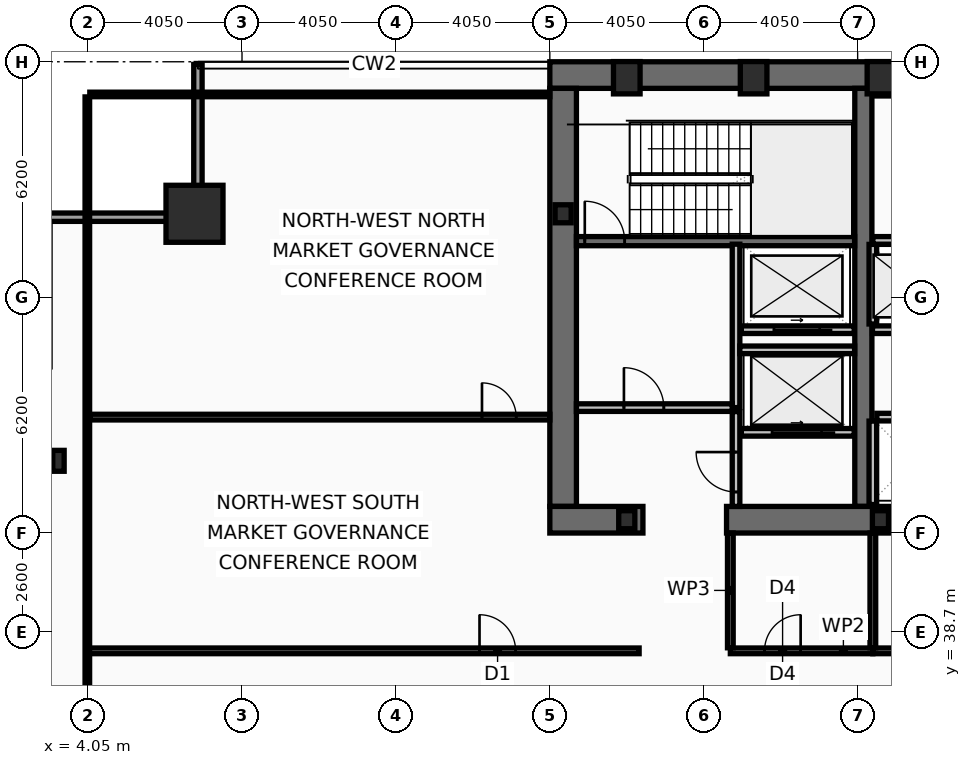
"""IFC4 building model, lengths in metres.
Left out: names, types, materials, properties, quantities, classifications, styles, units other than length and angle.
Written with IfcOpenShell. Run it as: python <this file> out.ifc"""

import sys

from ifc_helpers import new_model, si_unit, direction, frame, frame_2d, origin, origin_2d, place, context, subcontext, project, spatial, rectangle, hollow_rectangle, i_section, extrude, element, fill, save


model = new_model("IFC4")
c1 = context("Model", 3, precision=1e-05, world=origin(), true_north=direction((0.0, 1.0)))
c2 = subcontext(c1, "Body", "Model", "MODEL_VIEW")
j1 = project(units=[si_unit("LENGTHUNIT", "METRE"), si_unit("PLANEANGLEUNIT", "RADIAN")], contexts=[c1])
p1 = place(None, origin())
s1 = spatial("IfcSite", under=j1, at=p1, CompositionType="ELEMENT")
p2 = place(p1, origin())
s2 = spatial("IfcBuilding", under=s1, at=p2, CompositionType="ELEMENT")
p3 = place(p2, frame((0.0, 0.0, 102.6)))
s3 = spatial("IfcBuildingStorey", under=s2, at=p3, CompositionType="ELEMENT", Elevation=102.6)
p4 = place(p3, frame((16.2, 53.35, 0.0), z_axis=(0.0, 0.0, 1.0), x_axis=(1.0, 0.0, 0.0)))
e1 = element("IfcWall", 1, at=p4, inside=s3, PredefinedType="SHEAR", context=c2, shape_type="SweptSolid", body=[
    extrude(rectangle(XDim=40.5, YDim=0.7, at=frame_2d((20.25, 0.0))), origin(), (0.0, 0.0, 1.0), 3.8),
])
p5 = place(p3, frame((16.55, 42.0, 0.0), z_axis=(0.0, 0.0, 1.0), x_axis=(0.0, 1.0, 0.0)))
e2 = element("IfcWall", 2, at=p5, inside=s3, PredefinedType="SHEAR", context=c2, shape_type="SweptSolid", body=[
    extrude(rectangle(XDim=11.0, YDim=0.7, at=frame_2d((5.5, 0.0))), origin(), (0.0, 0.0, 1.0), 3.8),
])
p6 = place(p3, frame((24.45, 42.0, 0.0), z_axis=(0.0, 0.0, 1.0), x_axis=(0.0, 1.0, 0.0)))
e3 = element("IfcWall", 3, at=p6, inside=s3, PredefinedType="SHEAR", context=c2, shape_type="SweptSolid", body=[
    extrude(rectangle(XDim=11.0, YDim=0.45, at=frame_2d((5.5, 0.0))), origin(), (0.0, 0.0, 1.0), 3.8),
])
p7 = place(p3, frame((18.65, 41.65, 0.0), z_axis=(0.0, 0.0, 1.0), x_axis=(-1.0, 0.0, 0.0)))
e4 = element("IfcWall", 4, at=p7, inside=s3, PredefinedType="SHEAR", context=c2, shape_type="SweptSolid", body=[
    extrude(rectangle(XDim=2.45, YDim=0.7, at=frame_2d((1.225, 0.0))), origin(), (0.0, 0.0, 1.0), 3.8),
])
p8 = place(p3, frame((32.3, 41.65, 0.0), z_axis=(0.0, 0.0, 1.0), x_axis=(-1.0, 0.0, 0.0)))
e5 = element("IfcWall", 5, at=p8, inside=s3, PredefinedType="SHEAR", context=c2, shape_type="SweptSolid", body=[
    extrude(rectangle(XDim=11.45, YDim=0.7, at=frame_2d((5.725, 0.0))), origin(), (0.0, 0.0, 1.0), 3.8),
])
p9 = place(p3, frame((16.9, 48.98, 0.0), z_axis=(0.0, 0.0, 1.0), x_axis=(1.0, 0.0, 0.0)))
e6 = element("IfcWall", 6, at=p9, inside=s3, PredefinedType="SHEAR", context=c2, shape_type="SweptSolid", body=[
    extrude(rectangle(XDim=7.32, YDim=0.24, at=frame_2d((3.66, 0.0))), origin(), (0.0, 0.0, 1.0), 3.8),
])
p10 = place(p9, frame((0.22, 0.0, 0.0)))
e7 = element("IfcOpeningElement", 7, at=p10, cuts=e6, PredefinedType="OPENING", context=c2, shape_type="SweptSolid", body=[
    extrude(rectangle(XDim=1.05, YDim=2.15, at=frame_2d((0.525, 1.075))), frame((0.0, 0.13, 0.0), z_axis=(0.0, -1.0, 0.0), x_axis=(1.0, 0.0, 0.0)), (0.0, 0.0, 1.0), 0.26),
])
p11 = place(p3, frame((6.85, 49.7, 0.0), z_axis=(0.0, 0.0, 1.0), x_axis=(1.0, 0.0, 0.0)))
e8 = element("IfcColumn", 8, at=p11, inside=s3, PredefinedType="COLUMN", context=c2, shape_type="SweptSolid", body=[
    extrude(hollow_rectangle(XDim=1.5, YDim=1.5, WallThickness=0.07, at=origin_2d()), origin(), (0.0, 0.0, 1.0), 4.0),
])
for number, where, z_axis, x_axis in (
    (9, (18.225, 53.28, 0.0), (0.0, 0.0, 1.0), (1.0, 0.0, 0.0)),
    (10, (21.562, 53.28, 0.0), (0.0, 0.0, 1.0), (1.0, 0.0, 0.0)),
    (11, (24.9, 53.28, 0.0), (0.0, 0.0, 1.0), (1.0, 0.0, 0.0)),
):
    element("IfcColumn", number, at=place(p3, frame(where, z_axis=z_axis, x_axis=x_axis)), inside=s3, PredefinedType="COLUMN", context=c2, shape_type="SweptSolid", body=[
        extrude(hollow_rectangle(XDim=0.7, YDim=0.85, WallThickness=0.05, at=origin_2d()), origin(), (0.0, 0.0, 1.0), 4.0),
    ])
p12 = place(p3, frame((3.27, 43.2, 0.0), z_axis=(0.0, 0.0, 1.0), x_axis=(1.0, 0.0, 0.0)))
e12 = element("IfcColumn", 12, at=p12, inside=s3, PredefinedType="COLUMN", context=c2, shape_type="SweptSolid", body=[
    extrude(i_section(OverallWidth=0.3, OverallDepth=0.55, WebThickness=0.015, FlangeThickness=0.029, at=origin_2d()), origin(), (0.0, 0.0, 1.0), 4.0),
])
for number, where, z_axis, x_axis in (
    (13, (16.55, 49.7, 0.0), (0.0, 0.0, 1.0), (1.0, 0.0, 0.0)),
    (14, (18.225, 41.65, 0.0), (0.0, 0.0, 1.0), (1.0, 0.0, 0.0)),
    (15, (24.9, 41.65, 0.0), (0.0, 0.0, 1.0), (1.0, 0.0, 0.0)),
):
    element("IfcColumn", number, at=place(p3, frame(where, z_axis=z_axis, x_axis=x_axis)), inside=s3, PredefinedType="COLUMN", context=c2, shape_type="SweptSolid", body=[
        extrude(i_section(OverallWidth=0.424, OverallDepth=0.474, WebThickness=0.048, FlangeThickness=0.077, at=origin_2d()), origin(), (0.0, 0.0, 1.0), 4.0),
    ])
p13 = place(p3, frame((2.83, 49.61, 0.0), z_axis=(0.0, 0.0, 1.0), x_axis=(1.0, 0.0, 0.0)))
e16 = element("IfcWall", 16, at=p13, inside=s3, PredefinedType="SOLIDWALL", context=c2, shape_type="SweptSolid", body=[
    extrude(rectangle(XDim=4.22, YDim=0.22, at=frame_2d((2.11, 0.0))), origin(), (0.0, 0.0, 1.0), 3.14),
])
p14 = place(p3, frame((6.94, 49.72, 0.0), z_axis=(0.0, 0.0, 1.0), x_axis=(0.0, 1.0, 0.0)))
e17 = element("IfcWall", 17, at=p14, inside=s3, PredefinedType="SOLIDWALL", context=c2, shape_type="SweptSolid", body=[
    extrude(rectangle(XDim=3.91, YDim=0.22, at=frame_2d((1.955, 0.0))), origin(), (0.0, 0.0, 1.0), 3.14),
])
p15 = place(p3, frame((24.21, 43.95, 0.0), z_axis=(0.0, 0.0, 1.0), x_axis=(-1.0, 0.0, 0.0)))
e18 = element("IfcWall", 18, at=p15, inside=s3, PredefinedType="PARTITIONING", context=c2, shape_type="SweptSolid", body=[
    extrude(rectangle(XDim=2.97, YDim=0.2, at=frame_2d((1.485, 0.0))), origin(), (0.0, 0.0, 1.0), 3.8),
])
p16 = place(p15, frame((0.86, 0.0, 0.0)))
e19 = element("IfcOpeningElement", 19, at=p16, cuts=e18, PredefinedType="OPENING", context=c2, shape_type="SweptSolid", body=[
    extrude(rectangle(XDim=1.3, YDim=2.18, at=frame_2d((0.65, 1.09))), frame((0.0, 0.11, 0.0), z_axis=(0.0, -1.0, 0.0), x_axis=(1.0, 0.0, 0.0)), (0.0, 0.0, 1.0), 0.22),
])
p17 = place(p3, frame((24.21, 46.65, 0.0), z_axis=(0.0, 0.0, 1.0), x_axis=(-1.0, 0.0, 0.0)))
e20 = element("IfcWall", 20, at=p17, inside=s3, PredefinedType="PARTITIONING", context=c2, shape_type="SweptSolid", body=[
    extrude(rectangle(XDim=2.97, YDim=0.2, at=frame_2d((1.485, 0.0))), origin(), (0.0, 0.0, 1.0), 3.8),
])
p18 = place(p17, frame((0.91, 0.0, 0.0)))
e21 = element("IfcOpeningElement", 21, at=p18, cuts=e20, PredefinedType="OPENING", context=c2, shape_type="SweptSolid", body=[
    extrude(rectangle(XDim=1.2, YDim=2.18, at=frame_2d((0.6, 1.09))), frame((0.0, 0.11, 0.0), z_axis=(0.0, -1.0, 0.0), x_axis=(1.0, 0.0, 0.0)), (0.0, 0.0, 1.0), 0.22),
])
p19 = place(p3, frame((31.22, 46.65, 0.0), z_axis=(0.0, 0.0, 1.0), x_axis=(-1.0, 0.0, 0.0)))
e22 = element("IfcWall", 22, at=p19, inside=s3, PredefinedType="PARTITIONING", context=c2, shape_type="SweptSolid", body=[
    extrude(rectangle(XDim=6.53, YDim=0.2, at=frame_2d((3.265, 0.0))), origin(), (0.0, 0.0, 1.0), 3.8),
])
p20 = place(p19, frame((4.9, 0.0, 0.0)))
e23 = element("IfcOpeningElement", 23, at=p20, cuts=e22, PredefinedType="OPENING", context=c2, shape_type="SweptSolid", body=[
    extrude(rectangle(XDim=1.1, YDim=2.18, at=frame_2d((0.55, 1.09))), frame((0.0, 0.11, 0.0), z_axis=(0.0, -1.0, 0.0), x_axis=(1.0, 0.0, 0.0)), (0.0, 0.0, 1.0), 0.22),
])
p21 = place(p19, frame((2.74, 0.0, 0.0)))
e24 = element("IfcOpeningElement", 24, at=p21, cuts=e22, PredefinedType="OPENING", context=c2, shape_type="SweptSolid", body=[
    extrude(rectangle(XDim=1.1, YDim=2.18, at=frame_2d((0.55, 1.09))), frame((0.0, 0.11, 0.0), z_axis=(0.0, -1.0, 0.0), x_axis=(1.0, 0.0, 0.0)), (0.0, 0.0, 1.0), 0.22),
])
p22 = place(p19, frame((0.58, 0.0, 0.0)))
e25 = element("IfcOpeningElement", 25, at=p22, cuts=e22, PredefinedType="OPENING", context=c2, shape_type="SweptSolid", body=[
    extrude(rectangle(XDim=1.1, YDim=2.18, at=frame_2d((0.55, 1.09))), frame((0.0, 0.11, 0.0), z_axis=(0.0, -1.0, 0.0), x_axis=(1.0, 0.0, 0.0)), (0.0, 0.0, 1.0), 0.22),
])
p23 = place(p3, frame((21.1, 44.6, 0.0), z_axis=(0.0, 0.0, 1.0), x_axis=(0.0, 1.0, 0.0)))
e26 = element("IfcWall", 26, at=p23, inside=s3, PredefinedType="PARTITIONING", context=c2, shape_type="SweptSolid", body=[
    extrude(rectangle(XDim=4.3, YDim=0.2, at=frame_2d((2.15, 0.0))), origin(), (0.0, 0.0, 1.0), 3.8),
])
p24 = place(p3, frame((16.9, 44.6, 0.0), z_axis=(0.0, 0.0, 1.0), x_axis=(1.0, 0.0, 0.0)))
e27 = element("IfcWall", 27, at=p24, inside=s3, PredefinedType="PARTITIONING", context=c2, shape_type="SweptSolid", body=[
    extrude(rectangle(XDim=4.1, YDim=0.2, at=frame_2d((2.05, 0.0))), origin(), (0.0, 0.0, 1.0), 3.8),
])
p25 = place(p24, frame((1.25, 0.0, 0.0)))
e28 = element("IfcOpeningElement", 28, at=p25, cuts=e27, PredefinedType="OPENING", context=c2, shape_type="SweptSolid", body=[
    extrude(rectangle(XDim=1.05, YDim=2.15, at=frame_2d((0.525, 1.075))), frame((0.0, 0.11, 0.0), z_axis=(0.0, -1.0, 0.0), x_axis=(1.0, 0.0, 0.0)), (0.0, 0.0, 1.0), 0.22),
])
p26 = place(p3, frame((21.2, 46.12, 0.0), z_axis=(0.0, 0.0, 1.0), x_axis=(1.0, 0.0, 0.0)))
e29 = element("IfcWall", 29, at=p26, inside=s3, PredefinedType="PARTITIONING", context=c2, shape_type="SweptSolid", body=[
    extrude(rectangle(XDim=3.02, YDim=0.2, at=frame_2d((1.51, 0.0))), origin(), (0.0, 0.0, 1.0), 3.8),
])
p27 = place(p3, frame((21.1, 42.0, 0.0), z_axis=(0.0, 0.0, 1.0), x_axis=(0.0, 1.0, 0.0)))
e30 = element("IfcWall", 30, at=p27, inside=s3, PredefinedType="PARTITIONING", context=c2, shape_type="SweptSolid", body=[
    extrude(rectangle(XDim=2.495, YDim=0.2, at=frame_2d((1.248, 0.0))), origin(), (0.0, 0.0, 1.0), 3.8),
])
p28 = place(p27, frame((0.38, 0.0, 0.0)))
e31 = element("IfcOpeningElement", 31, at=p28, cuts=e30, PredefinedType="OPENING", context=c2, shape_type="SweptSolid", body=[
    extrude(rectangle(XDim=1.05, YDim=2.15, at=frame_2d((0.525, 1.075))), frame((0.0, 0.11, 0.0), z_axis=(0.0, -1.0, 0.0), x_axis=(1.0, 0.0, 0.0)), (0.0, 0.0, 1.0), 0.22),
])
p29 = place(p3, frame((24.7, 46.8, 0.0), z_axis=(0.0, 0.0, 1.0), x_axis=(0.0, 1.0, 0.0)))
e32 = element("IfcWall", 32, at=p29, inside=s3, PredefinedType="PARTITIONING", context=c2, shape_type="SweptSolid", body=[
    extrude(rectangle(XDim=2.095, YDim=0.2, at=frame_2d((1.047, 0.0))), origin(), (0.0, 0.0, 1.0), 3.8),
])
p30 = place(p3, frame((24.805, 44.35, 0.0), z_axis=(0.0, 0.0, 1.0), x_axis=(1.0, 0.0, 0.0)))
e33 = element("IfcWall", 33, at=p30, inside=s3, PredefinedType="PARTITIONING", context=c2, shape_type="SweptSolid", body=[
    extrude(rectangle(XDim=6.27, YDim=0.2, at=frame_2d((3.135, 0.0))), origin(), (0.0, 0.0, 1.0), 3.8),
])
p31 = place(p3, frame((24.7, 42.05, 0.0), z_axis=(0.0, 0.0, 1.0), x_axis=(0.0, 1.0, 0.0)))
e34 = element("IfcWall", 34, at=p31, inside=s3, PredefinedType="PARTITIONING", context=c2, shape_type="SweptSolid", body=[
    extrude(rectangle(XDim=2.195, YDim=0.2, at=frame_2d((1.098, 0.0))), origin(), (0.0, 0.0, 1.0), 3.8),
])
p32 = place(p3, frame((24.7, 52.86, 0.0), z_axis=(0.0, 0.0, 1.0), x_axis=(1.0, 0.0, 0.0)))
e35 = element("IfcWall", 35, at=p32, inside=s3, PredefinedType="PARTITIONING", context=c2, shape_type="SweptSolid", body=[
    extrude(rectangle(XDim=7.72, YDim=0.12, at=frame_2d((3.86, 0.0))), origin(), (0.0, 0.0, 1.0), 3.8),
])
p33 = place(p3, frame((24.7, 49.0, 0.0), z_axis=(0.0, 0.0, 1.0), x_axis=(1.0, 0.0, 0.0)))
e36 = element("IfcWall", 36, at=p33, inside=s3, PredefinedType="PARTITIONING", context=c2, shape_type="SweptSolid", body=[
    extrude(rectangle(XDim=7.72, YDim=0.2, at=frame_2d((3.86, 0.0))), origin(), (0.0, 0.0, 1.0), 3.8),
])
p34 = place(p33, frame((6.56, 0.0, 0.0)))
e37 = element("IfcOpeningElement", 37, at=p34, cuts=e36, PredefinedType="OPENING", context=c2, shape_type="SweptSolid", body=[
    extrude(rectangle(XDim=0.95, YDim=2.1, at=frame_2d((0.475, 1.05))), frame((0.0, 0.11, 0.0), z_axis=(0.0, -1.0, 0.0), x_axis=(1.0, 0.0, 0.0)), (0.0, 0.0, 1.0), 0.22),
])
p35 = place(p3, frame((20.95, 38.2, 0.0), z_axis=(0.0, 0.0, 1.0), x_axis=(1.0, 0.0, 0.0)))
e38 = element("IfcWall", 38, at=p35, inside=s3, PredefinedType="PARTITIONING", context=c2, shape_type="SweptSolid", body=[
    extrude(rectangle(XDim=3.75, YDim=0.15, at=frame_2d((1.875, 0.0))), origin(), (0.0, 0.0, 1.0), 2.99),
])
p36 = place(p35, frame((0.9, 0.0, 0.0)))
e39 = element("IfcOpeningElement", 39, at=p36, cuts=e38, PredefinedType="OPENING", context=c2, shape_type="SweptSolid", body=[
    extrude(rectangle(XDim=0.95, YDim=2.05, at=frame_2d((0.475, 1.025))), frame((0.0, 0.085, 0.0), z_axis=(0.0, -1.0, 0.0), x_axis=(1.0, 0.0, 0.0)), (0.0, 0.0, 1.0), 0.17),
])
p37 = place(p3, frame((24.7, 38.2, 0.0), z_axis=(0.0, 0.0, 1.0), x_axis=(1.0, 0.0, 0.0)))
e40 = element("IfcWall", 40, at=p37, inside=s3, PredefinedType="PARTITIONING", context=c2, shape_type="SweptSolid", body=[
    extrude(rectangle(XDim=4.1, YDim=0.15, at=frame_2d((2.05, 0.0))), origin(), (0.0, 0.0, 1.0), 2.99),
])
p38 = place(p37, frame((0.9, 0.0, 0.0)))
e41 = element("IfcOpeningElement", 41, at=p38, cuts=e40, PredefinedType="OPENING", context=c2, shape_type="SweptSolid", body=[
    extrude(rectangle(XDim=0.95, YDim=2.05, at=frame_2d((0.475, 1.025))), frame((0.0, 0.085, 0.0), z_axis=(0.0, -1.0, 0.0), x_axis=(1.0, 0.0, 0.0)), (0.0, 0.0, 1.0), 0.17),
])
p39 = place(p3, frame((20.95, 38.28, 0.0), z_axis=(0.0, 0.0, 1.0), x_axis=(0.0, 1.0, 0.0)))
e42 = element("IfcWall", 42, at=p39, inside=s3, PredefinedType="PARTITIONING", context=c2, shape_type="SweptSolid", body=[
    extrude(rectangle(XDim=3.02, YDim=0.15, at=frame_2d((1.51, 0.0))), origin(), (0.0, 0.0, 1.0), 3.8),
])
p40 = place(p3, frame((24.7, 38.28, 0.0), z_axis=(0.0, 0.0, 1.0), x_axis=(0.0, 1.0, 0.0)))
e43 = element("IfcWall", 43, at=p40, inside=s3, PredefinedType="PARTITIONING", context=c2, shape_type="SweptSolid", body=[
    extrude(rectangle(XDim=3.02, YDim=0.15, at=frame_2d((1.51, 0.0))), origin(), (0.0, 0.0, 1.0), 2.99),
])
p41 = place(p3, frame((4.03, 38.2, 0.0), z_axis=(0.0, 0.0, 1.0), x_axis=(1.0, 0.0, 0.0)))
e44 = element("IfcWall", 44, at=p41, inside=s3, PredefinedType="PARTITIONING", context=c2, shape_type="SweptSolid", body=[
    extrude(rectangle(XDim=14.52, YDim=0.15, at=frame_2d((7.26, 0.0))), origin(), (0.0, 0.0, 1.0), 2.99),
])
p42 = place(p41, frame((10.32, 0.0, 0.0)))
e45 = element("IfcOpeningElement", 45, at=p42, cuts=e44, PredefinedType="OPENING", context=c2, shape_type="SweptSolid", body=[
    extrude(rectangle(XDim=0.95, YDim=2.05, at=frame_2d((0.475, 1.025))), frame((0.0, 0.085, 0.0), z_axis=(0.0, -1.0, 0.0), x_axis=(1.0, 0.0, 0.0)), (0.0, 0.0, 1.0), 0.17),
])
p43 = place(p3, frame((4.095, 44.35, 0.0), z_axis=(0.0, 0.0, 1.0), x_axis=(1.0, 0.0, 0.0)))
e46 = element("IfcWall", 46, at=p43, inside=s3, PredefinedType="PARTITIONING", context=c2, shape_type="SweptSolid", body=[
    extrude(rectangle(XDim=12.105, YDim=0.15, at=frame_2d((6.052, 0.0))), origin(), (0.0, 0.0, 1.0), 3.14),
])
p44 = place(p43, frame((10.32, 0.0, 0.0)))
e47 = element("IfcOpeningElement", 47, at=p44, cuts=e46, PredefinedType="OPENING", context=c2, shape_type="SweptSolid", body=[
    extrude(rectangle(XDim=0.9, YDim=2.05, at=frame_2d((0.45, 1.025))), frame((0.0, 0.085, 0.0), z_axis=(0.0, -1.0, 0.0), x_axis=(1.0, 0.0, 0.0)), (0.0, 0.0, 1.0), 0.17),
])
p45 = place(p3, frame((4.03, 10.665, 0.0), z_axis=(0.0, 0.0, 1.0), x_axis=(0.0, 1.0, 0.0)))
e48 = element("IfcWall", 48, at=p45, inside=s3, PredefinedType="PARTITIONING", context=c2, shape_type="SweptSolid", body=[
    extrude(rectangle(XDim=42.11, YDim=0.12, at=frame_2d((21.055, 0.0))), origin(), (0.0, 0.0, 1.0), 2.99),
])
p46 = place(p3, frame((4.095, 52.84, 0.0), z_axis=(0.0, 0.0, 1.0), x_axis=(1.0, 0.0, 0.0)))
e49 = element("IfcWall", 49, at=p46, inside=s3, PredefinedType="PARTITIONING", context=c2, shape_type="SweptSolid", body=[
    extrude(rectangle(XDim=12.105, YDim=0.12, at=frame_2d((6.052, 0.0))), origin(), (0.0, 0.0, 1.0), 3.8),
])
p47 = place(p10, origin())
e50 = element("IfcDoor", 50, at=p47, inside=s3, OperationType="SINGLE_SWING_LEFT", PredefinedType="DOOR", context=c2, shape_type="SweptSolid", body=[
    extrude(rectangle(XDim=1.05, YDim=2.15, at=frame_2d((0.525, 1.075))), frame((0.0, 0.025, 0.0), z_axis=(0.0, -1.0, 0.0), x_axis=(1.0, 0.0, 0.0)), (0.0, 0.0, 1.0), 0.05),
])
fill(e7, e50)
p48 = place(p16, origin())
e51 = element("IfcDoor", 51, at=p48, inside=s3, OperationType="SLIDING_TO_LEFT", PredefinedType="DOOR", context=c2, shape_type="SweptSolid", body=[
    extrude(rectangle(XDim=1.3, YDim=2.18, at=frame_2d((0.65, 1.09))), frame((0.0, 0.025, 0.0), z_axis=(0.0, -1.0, 0.0), x_axis=(1.0, 0.0, 0.0)), (0.0, 0.0, 1.0), 0.05),
])
fill(e19, e51)
p49 = place(p18, origin())
e52 = element("IfcDoor", 52, at=p49, inside=s3, OperationType="SLIDING_TO_LEFT", PredefinedType="DOOR", context=c2, shape_type="SweptSolid", body=[
    extrude(rectangle(XDim=1.2, YDim=2.18, at=frame_2d((0.6, 1.09))), frame((0.0, 0.025, 0.0), z_axis=(0.0, -1.0, 0.0), x_axis=(1.0, 0.0, 0.0)), (0.0, 0.0, 1.0), 0.05),
])
fill(e21, e52)
p50 = place(p25, origin())
e53 = element("IfcDoor", 53, at=p50, inside=s3, OperationType="SINGLE_SWING_LEFT", PredefinedType="DOOR", context=c2, shape_type="SweptSolid", body=[
    extrude(rectangle(XDim=1.05, YDim=2.15, at=frame_2d((0.525, 1.075))), frame((0.0, 0.025, 0.0), z_axis=(0.0, -1.0, 0.0), x_axis=(1.0, 0.0, 0.0)), (0.0, 0.0, 1.0), 0.05),
])
fill(e28, e53)
p51 = place(p28, origin())
e54 = element("IfcDoor", 54, at=p51, inside=s3, OperationType="SINGLE_SWING_RIGHT", PredefinedType="DOOR", context=c2, shape_type="SweptSolid", body=[
    extrude(rectangle(XDim=1.05, YDim=2.15, at=frame_2d((0.525, 1.075))), frame((0.0, 0.025, 0.0), z_axis=(0.0, -1.0, 0.0), x_axis=(1.0, 0.0, 0.0)), (0.0, 0.0, 1.0), 0.05),
])
fill(e31, e54)
p52 = place(p36, origin())
e55 = element("IfcDoor", 55, at=p52, inside=s3, OperationType="SINGLE_SWING_RIGHT", PredefinedType="DOOR", context=c2, shape_type="SweptSolid", body=[
    extrude(rectangle(XDim=0.95, YDim=2.05, at=frame_2d((0.475, 1.025))), frame((0.0, 0.025, 0.0), z_axis=(0.0, -1.0, 0.0), x_axis=(1.0, 0.0, 0.0)), (0.0, 0.0, 1.0), 0.05),
])
fill(e39, e55)
p53 = place(p42, origin())
e56 = element("IfcDoor", 56, at=p53, inside=s3, OperationType="SINGLE_SWING_LEFT", PredefinedType="DOOR", context=c2, shape_type="SweptSolid", body=[
    extrude(rectangle(XDim=0.95, YDim=2.05, at=frame_2d((0.475, 1.025))), frame((0.0, 0.025, 0.0), z_axis=(0.0, -1.0, 0.0), x_axis=(1.0, 0.0, 0.0)), (0.0, 0.0, 1.0), 0.05),
])
fill(e45, e56)
p54 = place(p44, origin())
e57 = element("IfcDoor", 57, at=p54, inside=s3, OperationType="SINGLE_SWING_LEFT", PredefinedType="DOOR", context=c2, shape_type="SweptSolid", body=[
    extrude(rectangle(XDim=0.9, YDim=2.05, at=frame_2d((0.45, 1.025))), frame((0.0, 0.025, 0.0), z_axis=(0.0, -1.0, 0.0), x_axis=(1.0, 0.0, 0.0)), (0.0, 0.0, 1.0), 0.05),
])
fill(e47, e57)
save(model, sys.argv[1])
